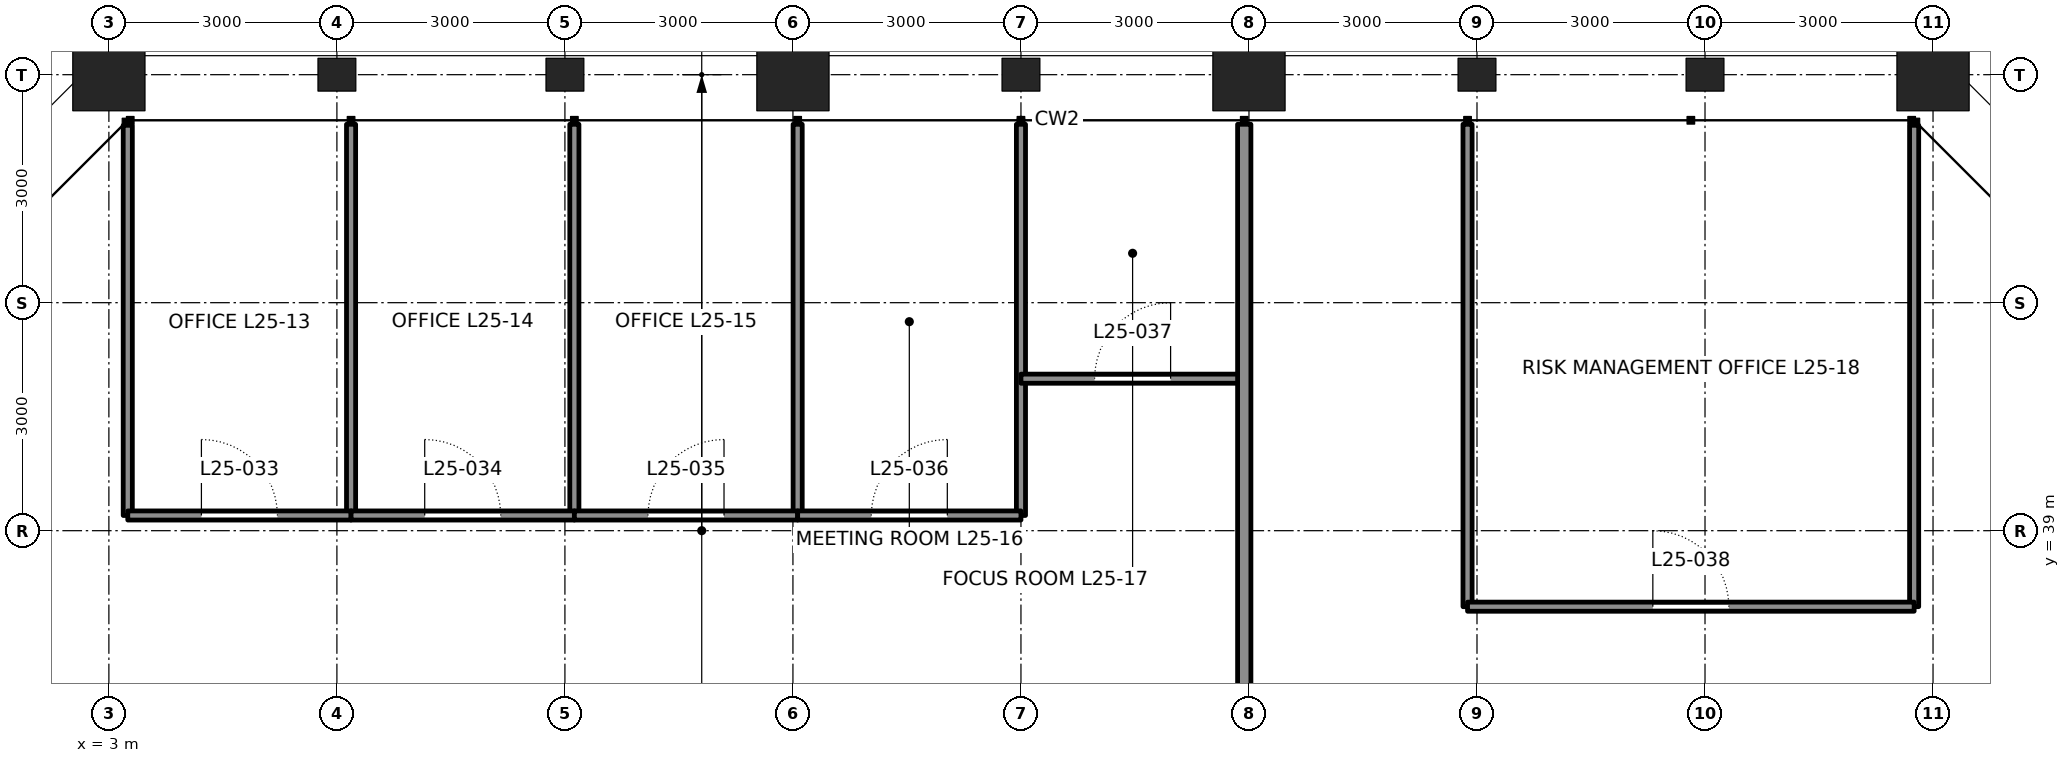
"""IFC4 building model, lengths in metres.
Left out: names, types, materials, properties, quantities, classifications, styles, units other than length and angle.
Written with IfcOpenShell. Run it as: python <this file> out.ifc"""

import sys

from ifc_helpers import new_model, si_unit, direction, frame, frame_2d, origin, origin_2d, place, context, subcontext, project, spatial, rectangle, hollow_rectangle, i_section, extrude, element, fill, save


model = new_model("IFC4")
c1 = context("Model", 3, precision=1e-05, world=origin(), true_north=direction((0.0, 1.0)))
c2 = subcontext(c1, "Body", "Model", "MODEL_VIEW")
j1 = project(units=[si_unit("LENGTHUNIT", "METRE"), si_unit("PLANEANGLEUNIT", "RADIAN")], contexts=[c1])
p1 = place(None, origin())
s1 = spatial("IfcSite", under=j1, at=p1, CompositionType="ELEMENT")
p2 = place(p1, origin())
s2 = spatial("IfcBuilding", under=s1, at=p2, CompositionType="ELEMENT")
p3 = place(p2, frame((0.0, 0.0, 119.4)))
s3 = spatial("IfcBuildingStorey", under=s2, at=p3, CompositionType="ELEMENT", Elevation=119.4)
p4 = place(p3, frame((27.0, 45.0, 0.0), z_axis=(0.0, 0.0, 1.0), x_axis=(0.0, 1.0, 0.0)))
e1 = element("IfcColumn", 1, at=p4, inside=s3, PredefinedType="COLUMN", context=c2, shape_type="SweptSolid", body=[
    extrude(hollow_rectangle(XDim=0.95, YDim=0.95, WallThickness=0.095, at=origin_2d()), origin(), (0.0, 0.0, 1.0), 4.2),
])
for number, where, z_axis, x_axis in (
    (2, (24.0, 45.0, 0.0), (0.0, 0.0, 1.0), (0.0, 1.0, 0.0)),
    (3, (21.0, 45.0, 0.0), (0.0, 0.0, 1.0), (0.0, 1.0, 0.0)),
):
    element("IfcColumn", number, at=place(p3, frame(where, z_axis=z_axis, x_axis=x_axis)), inside=s3, PredefinedType="COLUMN", context=c2, shape_type="SweptSolid", body=[
        extrude(i_section(OverallWidth=0.432, OverallDepth=0.498, WebThickness=0.056, FlangeThickness=0.089, at=origin_2d()), origin(), (0.0, 0.0, 1.0), 4.2),
    ])
p5 = place(p3, frame((18.0, 45.0, 0.0), z_axis=(0.0, 0.0, 1.0), x_axis=(0.0, 1.0, 0.0)))
e4 = element("IfcColumn", 4, at=p5, inside=s3, PredefinedType="COLUMN", context=c2, shape_type="SweptSolid", body=[
    extrude(hollow_rectangle(XDim=0.95, YDim=0.95, WallThickness=0.11, at=origin_2d()), origin(), (0.0, 0.0, 1.0), 4.2),
])
p6 = place(p3, frame((15.0, 45.0, 0.0), z_axis=(0.0, 0.0, 1.0), x_axis=(0.0, 1.0, 0.0)))
e5 = element("IfcColumn", 5, at=p6, inside=s3, PredefinedType="COLUMN", context=c2, shape_type="SweptSolid", body=[
    extrude(i_section(OverallWidth=0.432, OverallDepth=0.498, WebThickness=0.056, FlangeThickness=0.089, at=origin_2d()), origin(), (0.0, 0.0, 1.0), 4.2),
])
p7 = place(p3, frame((12.0, 45.0, 0.0), z_axis=(0.0, 0.0, 1.0), x_axis=(0.0, 1.0, 0.0)))
e6 = element("IfcColumn", 6, at=p7, inside=s3, PredefinedType="COLUMN", context=c2, shape_type="SweptSolid", body=[
    extrude(hollow_rectangle(XDim=0.95, YDim=0.95, WallThickness=0.11, at=origin_2d()), origin(), (0.0, 0.0, 1.0), 4.2),
])
for number, where, z_axis, x_axis in (
    (7, (9.0, 45.0, 0.0), (0.0, 0.0, 1.0), (0.0, 1.0, 0.0)),
    (8, (6.0, 45.0, 0.0), (0.0, 0.0, 1.0), (0.0, 1.0, 0.0)),
):
    element("IfcColumn", number, at=place(p3, frame(where, z_axis=z_axis, x_axis=x_axis)), inside=s3, PredefinedType="COLUMN", context=c2, shape_type="SweptSolid", body=[
        extrude(i_section(OverallWidth=0.432, OverallDepth=0.498, WebThickness=0.056, FlangeThickness=0.089, at=origin_2d()), origin(), (0.0, 0.0, 1.0), 4.2),
    ])
p8 = place(p3, frame((3.0, 45.0, 0.0), z_axis=(0.0, 0.0, 1.0), x_axis=(0.0, 1.0, 0.0)))
e9 = element("IfcColumn", 9, at=p8, inside=s3, PredefinedType="COLUMN", context=c2, shape_type="SweptSolid", body=[
    extrude(hollow_rectangle(XDim=0.95, YDim=0.95, WallThickness=0.095, at=origin_2d()), origin(), (0.0, 0.0, 1.0), 4.2),
])
p9 = place(p3, frame((3.249, 44.334, 0.0), z_axis=(0.0, 0.0, 1.0), x_axis=(0.0, -1.0, 0.0)))
e10 = element("IfcWall", 10, at=p9, inside=s3, PredefinedType="PARTITIONING", context=c2, shape_type="SweptSolid", body=[
    extrude(rectangle(XDim=5.134, YDim=0.12, at=frame_2d((2.567, 0.0))), origin(), (0.0, 0.0, 1.0), 4.04),
])
for number, where, z_axis, x_axis in (
    (11, (6.186, 44.347, 0.0), (0.0, 0.0, 1.0), (0.0, -1.0, 0.0)),
    (12, (9.124, 44.347, 0.0), (0.0, 0.0, 1.0), (0.0, -1.0, 0.0)),
):
    element("IfcWall", number, at=place(p3, frame(where, z_axis=z_axis, x_axis=x_axis)), inside=s3, PredefinedType="PARTITIONING", context=c2, shape_type="SweptSolid", body=[
        extrude(rectangle(XDim=5.147, YDim=0.12, at=frame_2d((2.574, 0.0))), origin(), (0.0, 0.0, 1.0), 4.04),
    ])
p10 = place(p3, frame((12.062, 44.347, 0.0), z_axis=(0.0, 0.0, 1.0), x_axis=(0.0, -1.0, 0.0)))
e13 = element("IfcWall", 13, at=p10, inside=s3, PredefinedType="PARTITIONING", context=c2, shape_type="SweptSolid", body=[
    extrude(rectangle(XDim=5.147, YDim=0.12, at=frame_2d((2.574, 0.0))), origin(), (0.0, 0.0, 1.0), 3.271),
])
p11 = place(p3, frame((15.0, 44.347, 0.0), z_axis=(0.0, 0.0, 1.0), x_axis=(0.0, -1.0, 0.0)))
e14 = element("IfcWall", 14, at=p11, inside=s3, PredefinedType="PARTITIONING", context=c2, shape_type="SweptSolid", body=[
    extrude(rectangle(XDim=5.147, YDim=0.12, at=frame_2d((2.574, 0.0))), origin(), (0.0, 0.0, 1.0), 3.357),
])
p12 = place(p3, frame((20.876, 44.347, 0.0), z_axis=(0.0, 0.0, 1.0), x_axis=(0.0, -1.0, 0.0)))
e15 = element("IfcWall", 15, at=p12, inside=s3, PredefinedType="PARTITIONING", context=c2, shape_type="SweptSolid", body=[
    extrude(rectangle(XDim=6.347, YDim=0.12, at=frame_2d((3.174, 0.0))), origin(), (0.0, 0.0, 1.0), 3.357),
])
p13 = place(p3, frame((26.751, 44.334, 0.0), z_axis=(0.0, 0.0, 1.0), x_axis=(0.0, -1.0, 0.0)))
e16 = element("IfcWall", 16, at=p13, inside=s3, PredefinedType="PARTITIONING", context=c2, shape_type="SweptSolid", body=[
    extrude(rectangle(XDim=6.334, YDim=0.12, at=frame_2d((3.167, 0.0))), origin(), (0.0, 0.0, 1.0), 4.04),
])
p14 = place(p3, frame((3.249, 39.2, 0.0), z_axis=(0.0, 0.0, 1.0), x_axis=(1.0, 0.0, 0.0)))
e17 = element("IfcWall", 17, at=p14, inside=s3, PredefinedType="PARTITIONING", context=c2, shape_type="SweptSolid", body=[
    extrude(rectangle(XDim=2.938, YDim=0.12, at=frame_2d((1.469, 0.0))), origin(), (0.0, 0.0, 1.0), 4.04),
])
p15 = place(p14, frame((0.969, 0.0, 0.0)))
e18 = element("IfcOpeningElement", 18, at=p15, cuts=e17, PredefinedType="OPENING", context=c2, shape_type="SweptSolid", body=[
    extrude(rectangle(XDim=1.0, YDim=2.4, at=frame_2d((0.5, 1.2))), frame((0.0, 0.07, 0.0), z_axis=(0.0, -1.0, 0.0), x_axis=(1.0, 0.0, 0.0)), (0.0, 0.0, 1.0), 0.14),
])
p16 = place(p3, frame((6.186, 39.2, 0.0), z_axis=(0.0, 0.0, 1.0), x_axis=(1.0, 0.0, 0.0)))
e19 = element("IfcWall", 19, at=p16, inside=s3, PredefinedType="PARTITIONING", context=c2, shape_type="SweptSolid", body=[
    extrude(rectangle(XDim=2.938, YDim=0.12, at=frame_2d((1.469, 0.0))), origin(), (0.0, 0.0, 1.0), 4.04),
])
p17 = place(p16, frame((0.969, 0.0, 0.0)))
e20 = element("IfcOpeningElement", 20, at=p17, cuts=e19, PredefinedType="OPENING", context=c2, shape_type="SweptSolid", body=[
    extrude(rectangle(XDim=1.0, YDim=2.4, at=frame_2d((0.5, 1.2))), frame((0.0, 0.07, 0.0), z_axis=(0.0, -1.0, 0.0), x_axis=(1.0, 0.0, 0.0)), (0.0, 0.0, 1.0), 0.14),
])
p18 = place(p3, frame((9.124, 39.2, 0.0), z_axis=(0.0, 0.0, 1.0), x_axis=(1.0, 0.0, 0.0)))
e21 = element("IfcWall", 21, at=p18, inside=s3, PredefinedType="PARTITIONING", context=c2, shape_type="SweptSolid", body=[
    extrude(rectangle(XDim=2.938, YDim=0.12, at=frame_2d((1.469, 0.0))), origin(), (0.0, 0.0, 1.0), 4.04),
])
p19 = place(p18, frame((0.969, 0.0, 0.0)))
e22 = element("IfcOpeningElement", 22, at=p19, cuts=e21, PredefinedType="OPENING", context=c2, shape_type="SweptSolid", body=[
    extrude(rectangle(XDim=1.0, YDim=2.4, at=frame_2d((0.5, 1.2))), frame((0.0, 0.07, 0.0), z_axis=(0.0, -1.0, 0.0), x_axis=(1.0, 0.0, 0.0)), (0.0, 0.0, 1.0), 0.14),
])
p20 = place(p3, frame((12.062, 39.2, 0.0), z_axis=(0.0, 0.0, 1.0), x_axis=(1.0, 0.0, 0.0)))
e23 = element("IfcWall", 23, at=p20, inside=s3, PredefinedType="PARTITIONING", context=c2, shape_type="SweptSolid", body=[
    extrude(rectangle(XDim=2.938, YDim=0.12, at=frame_2d((1.469, 0.0))), origin(), (0.0, 0.0, 1.0), 4.04),
])
p21 = place(p20, frame((0.969, 0.0, 0.0)))
e24 = element("IfcOpeningElement", 24, at=p21, cuts=e23, PredefinedType="OPENING", context=c2, shape_type="SweptSolid", body=[
    extrude(rectangle(XDim=1.0, YDim=2.4, at=frame_2d((0.5, 1.2))), frame((0.0, 0.07, 0.0), z_axis=(0.0, -1.0, 0.0), x_axis=(1.0, 0.0, 0.0)), (0.0, 0.0, 1.0), 0.14),
])
p22 = place(p3, frame((15.0, 41.0, 0.0), z_axis=(0.0, 0.0, 1.0), x_axis=(1.0, 0.0, 0.0)))
e25 = element("IfcWall", 25, at=p22, inside=s3, PredefinedType="PARTITIONING", context=c2, shape_type="SweptSolid", body=[
    extrude(rectangle(XDim=2.938, YDim=0.12, at=frame_2d((1.469, 0.0))), origin(), (0.0, 0.0, 1.0), 4.04),
])
p23 = place(p22, frame((0.969, 0.0, 0.0)))
e26 = element("IfcOpeningElement", 26, at=p23, cuts=e25, PredefinedType="OPENING", context=c2, shape_type="SweptSolid", body=[
    extrude(rectangle(XDim=1.0, YDim=2.4, at=frame_2d((0.5, 1.2))), frame((0.0, 0.07, 0.0), z_axis=(0.0, -1.0, 0.0), x_axis=(1.0, 0.0, 0.0)), (0.0, 0.0, 1.0), 0.14),
])
p24 = place(p3, frame((20.876, 38.0, 0.0), z_axis=(0.0, 0.0, 1.0), x_axis=(1.0, 0.0, 0.0)))
e27 = element("IfcWall", 27, at=p24, inside=s3, PredefinedType="PARTITIONING", context=c2, shape_type="SweptSolid", body=[
    extrude(rectangle(XDim=5.876, YDim=0.12, at=frame_2d((2.938, 0.0))), origin(), (0.0, 0.0, 1.0), 4.04),
])
p25 = place(p24, frame((2.438, 0.0, 0.0)))
e28 = element("IfcOpeningElement", 28, at=p25, cuts=e27, PredefinedType="OPENING", context=c2, shape_type="SweptSolid", body=[
    extrude(rectangle(XDim=1.0, YDim=2.4, at=frame_2d((0.5, 1.2))), frame((0.0, 0.07, 0.0), z_axis=(0.0, -1.0, 0.0), x_axis=(1.0, 0.0, 0.0)), (0.0, 0.0, 1.0), 0.14),
])
p26 = place(p3, frame((17.938, 44.347, 0.0), z_axis=(0.0, 0.0, 1.0), x_axis=(0.0, -1.0, 0.0)))
e29 = element("IfcWall", 29, at=p26, inside=s3, PredefinedType="PARTITIONING", context=c2, shape_type="SweptSolid", body=[
    extrude(rectangle(XDim=8.347, YDim=0.175, at=frame_2d((4.174, 0.0))), origin(), (0.0, 0.0, 1.0), 3.357),
])
p27 = place(p15, origin())
e30 = element("IfcDoor", 30, at=p27, inside=s3, OperationType="SINGLE_SWING_LEFT", PredefinedType="DOOR", context=c2, shape_type="SweptSolid", body=[
    extrude(rectangle(XDim=1.0, YDim=2.4, at=frame_2d((0.5, 1.2))), frame((0.0, 0.025, 0.0), z_axis=(0.0, -1.0, 0.0), x_axis=(1.0, 0.0, 0.0)), (0.0, 0.0, 1.0), 0.05),
])
fill(e18, e30)
p28 = place(p17, origin())
e31 = element("IfcDoor", 31, at=p28, inside=s3, OperationType="SINGLE_SWING_LEFT", PredefinedType="DOOR", context=c2, shape_type="SweptSolid", body=[
    extrude(rectangle(XDim=1.0, YDim=2.4, at=frame_2d((0.5, 1.2))), frame((0.0, 0.025, 0.0), z_axis=(0.0, -1.0, 0.0), x_axis=(1.0, 0.0, 0.0)), (0.0, 0.0, 1.0), 0.05),
])
fill(e20, e31)
p29 = place(p19, origin())
e32 = element("IfcDoor", 32, at=p29, inside=s3, OperationType="SINGLE_SWING_RIGHT", PredefinedType="DOOR", context=c2, shape_type="SweptSolid", body=[
    extrude(rectangle(XDim=1.0, YDim=2.4, at=frame_2d((0.5, 1.2))), frame((0.0, 0.025, 0.0), z_axis=(0.0, -1.0, 0.0), x_axis=(1.0, 0.0, 0.0)), (0.0, 0.0, 1.0), 0.05),
])
fill(e22, e32)
p30 = place(p21, origin())
e33 = element("IfcDoor", 33, at=p30, inside=s3, OperationType="SINGLE_SWING_RIGHT", PredefinedType="DOOR", context=c2, shape_type="SweptSolid", body=[
    extrude(rectangle(XDim=1.0, YDim=2.4, at=frame_2d((0.5, 1.2))), frame((0.0, 0.025, 0.0), z_axis=(0.0, -1.0, 0.0), x_axis=(1.0, 0.0, 0.0)), (0.0, 0.0, 1.0), 0.05),
])
fill(e24, e33)
p31 = place(p23, origin())
e34 = element("IfcDoor", 34, at=p31, inside=s3, OperationType="SINGLE_SWING_RIGHT", PredefinedType="DOOR", context=c2, shape_type="SweptSolid", body=[
    extrude(rectangle(XDim=1.0, YDim=2.4, at=frame_2d((0.5, 1.2))), frame((0.0, 0.025, 0.0), z_axis=(0.0, -1.0, 0.0), x_axis=(1.0, 0.0, 0.0)), (0.0, 0.0, 1.0), 0.05),
])
fill(e26, e34)
p32 = place(p25, origin())
e35 = element("IfcDoor", 35, at=p32, inside=s3, OperationType="SINGLE_SWING_LEFT", PredefinedType="DOOR", context=c2, shape_type="SweptSolid", body=[
    extrude(rectangle(XDim=1.0, YDim=2.4, at=frame_2d((0.5, 1.2))), frame((0.0, 0.025, 0.0), z_axis=(0.0, -1.0, 0.0), x_axis=(1.0, 0.0, 0.0)), (0.0, 0.0, 1.0), 0.05),
])
fill(e28, e35)
save(model, sys.argv[1])
